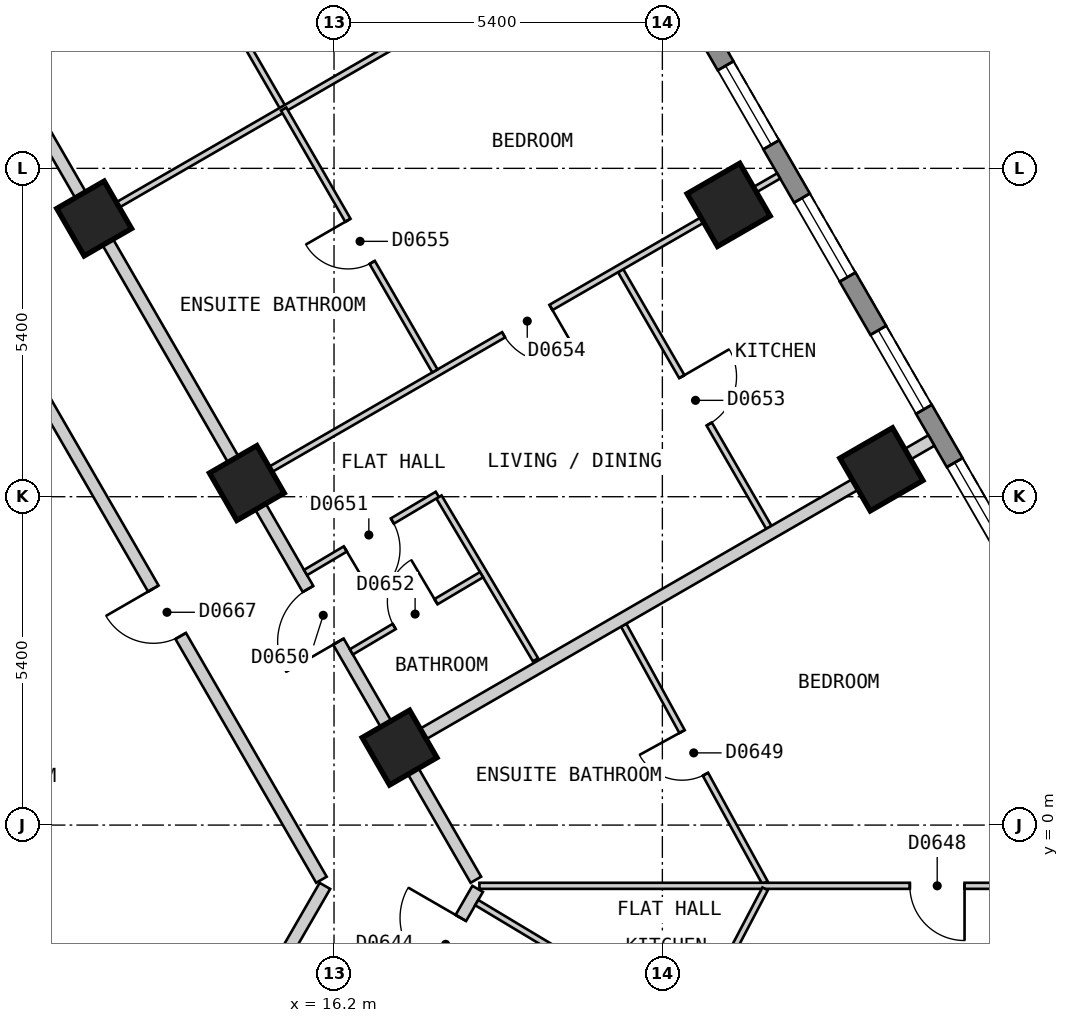
"""IFC4 building model, lengths in metres.
Left out: names, types, materials, properties, quantities, classifications, styles, units other than length and angle.
Written with IfcOpenShell. Run it as: python <this file> out.ifc"""

import sys

from ifc_helpers import new_model, si_unit, direction, frame, frame_2d, origin, origin_2d, place, context, subcontext, project, spatial, polyline, rectangle, outline, extrude, element, fill, save


model = new_model("IFC4")
c1 = context("Model", 3, precision=1e-05, world=origin(), true_north=direction((0.0, 1.0)))
c2 = subcontext(c1, "Body", "Model", "MODEL_VIEW")
j1 = project(units=[si_unit("LENGTHUNIT", "METRE"), si_unit("PLANEANGLEUNIT", "RADIAN")], contexts=[c1])
p1 = place(None, origin())
s1 = spatial("IfcSite", under=j1, at=p1, CompositionType="ELEMENT")
p2 = place(p1, origin())
s2 = spatial("IfcBuilding", under=s1, at=p2, CompositionType="ELEMENT")
p3 = place(p2, frame((0.0, 0.0, 81.0)))
s3 = spatial("IfcBuildingStorey", under=s2, at=p3, CompositionType="ELEMENT", Elevation=81.0)
for number, where, z_axis, x_axis in (
    (1, (25.202, 5.85, 0.0), (0.0, 0.0, 1.0), (-0.5, 0.866, 0.0)),
    (2, (22.69, 10.2, 0.0), (0.0, 0.0, 1.0), (-0.5, 0.866, 0.0)),
):
    element("IfcColumn", number, at=place(p3, frame(where, z_axis=z_axis, x_axis=x_axis)), inside=s3, PredefinedType="COLUMN", context=c2, shape_type="SweptSolid", body=[
        extrude(rectangle(XDim=1.0, YDim=1.0, at=origin_2d()), origin(), (0.0, 0.0, 1.0), 3.0),
    ])
for number, where, z_axis, x_axis in (
    (3, (17.278, 1.274, 0.0), (0.0, 0.0, 1.0), (-0.5, 0.866, 0.0)),
    (4, (14.766, 5.625, 0.0), (0.0, 0.0, 1.0), (-0.5, 0.866, 0.0)),
    (5, (12.255, 9.975, 0.0), (0.0, 0.0, 1.0), (-0.5, 0.866, 0.0)),
):
    element("IfcColumn", number, at=place(p3, frame(where, z_axis=z_axis, x_axis=x_axis)), inside=s3, PredefinedType="COLUMN", context=c2, shape_type="SweptSolid", body=[
        extrude(rectangle(XDim=0.9, YDim=0.9, at=origin_2d()), origin(), (0.0, 0.0, 1.0), 3.0),
    ])
p4 = place(p3, frame((29.027, 1.425, 0.0), z_axis=(0.0, 0.0, 1.0), x_axis=(-0.500027479704, 0.866009537788, 0.0)))
e6 = element("IfcWall", 6, at=p4, inside=s3, PredefinedType="SOLIDWALL", context=c2, shape_type="SweptSolid", body=[
    extrude(outline(polyline([(0.0, -0.15), (26.559, -0.15), (26.478, 0.15), (0.08, 0.15), (0.0, -0.15)])), origin(), (0.0, 0.0, 1.0), 2.7),
])
p5 = place(p4, frame((1.227, 0.0, 0.15)))
e7 = element("IfcOpeningElement", 7, at=p5, cuts=e6, PredefinedType="OPENING", context=c2, shape_type="SweptSolid", body=[
    extrude(rectangle(XDim=1.5, YDim=2.1, at=frame_2d((0.75, 1.05))), frame((0.0, 0.16, 0.0), z_axis=(0.0, -1.0, 0.0), x_axis=(1.0, 0.0, 0.0)), (0.0, 0.0, 1.0), 0.32),
])
p6 = place(p4, frame((3.738, 0.0, 0.15)))
e8 = element("IfcOpeningElement", 8, at=p6, cuts=e6, PredefinedType="OPENING", context=c2, shape_type="SweptSolid", body=[
    extrude(rectangle(XDim=1.5, YDim=2.1, at=frame_2d((0.75, 1.05))), frame((0.0, 0.16, 0.0), z_axis=(0.0, -1.0, 0.0), x_axis=(1.0, 0.0, 0.0)), (0.0, 0.0, 1.0), 0.32),
])
p7 = place(p4, frame((6.25, 0.0, 0.15)))
e9 = element("IfcOpeningElement", 9, at=p7, cuts=e6, PredefinedType="OPENING", context=c2, shape_type="SweptSolid", body=[
    extrude(rectangle(XDim=1.5, YDim=2.1, at=frame_2d((0.75, 1.05))), frame((0.0, 0.16, 0.0), z_axis=(0.0, -1.0, 0.0), x_axis=(1.0, 0.0, 0.0)), (0.0, 0.0, 1.0), 0.32),
])
p8 = place(p4, frame((8.761, 0.0, 0.15)))
e10 = element("IfcOpeningElement", 10, at=p8, cuts=e6, PredefinedType="OPENING", context=c2, shape_type="SweptSolid", body=[
    extrude(rectangle(XDim=1.5, YDim=2.1, at=frame_2d((0.75, 1.05))), frame((0.0, 0.16, 0.0), z_axis=(0.0, -1.0, 0.0), x_axis=(1.0, 0.0, 0.0)), (0.0, 0.0, 1.0), 0.32),
])
p9 = place(p4, frame((11.273, 0.0, 0.15)))
e11 = element("IfcOpeningElement", 11, at=p9, cuts=e6, PredefinedType="OPENING", context=c2, shape_type="SweptSolid", body=[
    extrude(rectangle(XDim=1.5, YDim=2.1, at=frame_2d((0.75, 1.05))), frame((0.0, 0.16, 0.0), z_axis=(0.0, -1.0, 0.0), x_axis=(1.0, 0.0, 0.0)), (0.0, 0.0, 1.0), 0.32),
])
p10 = place(p4, frame((13.785, 0.0, 0.15)))
e12 = element("IfcOpeningElement", 12, at=p10, cuts=e6, PredefinedType="OPENING", context=c2, shape_type="SweptSolid", body=[
    extrude(rectangle(XDim=1.5, YDim=2.1, at=frame_2d((0.75, 1.05))), frame((0.0, 0.16, 0.0), z_axis=(0.0, -1.0, 0.0), x_axis=(1.0, 0.0, 0.0)), (0.0, 0.0, 1.0), 0.32),
])
p11 = place(p4, frame((16.296, 0.0, 0.15)))
e13 = element("IfcOpeningElement", 13, at=p11, cuts=e6, PredefinedType="OPENING", context=c2, shape_type="SweptSolid", body=[
    extrude(rectangle(XDim=1.5, YDim=2.1, at=frame_2d((0.75, 1.05))), frame((0.0, 0.16, 0.0), z_axis=(0.0, -1.0, 0.0), x_axis=(1.0, 0.0, 0.0)), (0.0, 0.0, 1.0), 0.32),
])
p12 = place(p4, frame((18.807, 0.0, 0.15)))
e14 = element("IfcOpeningElement", 14, at=p12, cuts=e6, PredefinedType="OPENING", context=c2, shape_type="SweptSolid", body=[
    extrude(rectangle(XDim=1.5, YDim=2.1, at=frame_2d((0.75, 1.05))), frame((0.0, 0.16, 0.0), z_axis=(0.0, -1.0, 0.0), x_axis=(1.0, 0.0, 0.0)), (0.0, 0.0, 1.0), 0.32),
])
p13 = place(p4, frame((21.319, 0.0, 0.15)))
e15 = element("IfcOpeningElement", 15, at=p13, cuts=e6, PredefinedType="OPENING", context=c2, shape_type="SweptSolid", body=[
    extrude(rectangle(XDim=1.5, YDim=2.1, at=frame_2d((0.75, 1.05))), frame((0.0, 0.16, 0.0), z_axis=(0.0, -1.0, 0.0), x_axis=(1.0, 0.0, 0.0)), (0.0, 0.0, 1.0), 0.32),
])
p14 = place(p4, frame((23.831, 0.0, 0.15)))
e16 = element("IfcOpeningElement", 16, at=p14, cuts=e6, PredefinedType="OPENING", context=c2, shape_type="SweptSolid", body=[
    extrude(rectangle(XDim=1.5, YDim=2.1, at=frame_2d((0.75, 1.05))), frame((0.0, 0.16, 0.0), z_axis=(0.0, -1.0, 0.0), x_axis=(1.0, 0.0, 0.0)), (0.0, 0.0, 1.0), 0.32),
])
p15 = place(p3, frame((10.913, 7.899, 0.0), z_axis=(0.0, 0.0, 1.0), x_axis=(0.500028940566, -0.866008694296, 0.0)))
e17 = element("IfcWall", 17, at=p15, inside=s3, PredefinedType="PARTITIONING", context=c2, shape_type="SweptSolid", body=[
    extrude(rectangle(XDim=10.159, YDim=0.2, at=frame_2d((5.08, 0.0))), origin(), (0.0, 0.0, 1.0), 2.7),
])
p16 = place(p15, frame((4.63, 0.0, 0.0)))
e18 = element("IfcOpeningElement", 18, at=p16, cuts=e17, PredefinedType="OPENING", context=c2, shape_type="SweptSolid", body=[
    extrude(rectangle(XDim=0.9, YDim=2.1, at=frame_2d((0.45, 1.05))), frame((0.0, 0.11, 0.0), z_axis=(0.0, -1.0, 0.0), x_axis=(1.0, 0.0, 0.0)), (0.0, 0.0, 1.0), 0.22),
])
p17 = place(p3, frame((8.488, 16.5, 0.0), z_axis=(0.0, 0.0, 1.0), x_axis=(0.499986836607, -0.86603300354, 0.0)))
e19 = element("IfcWall", 19, at=p17, inside=s3, PredefinedType="PARTITIONING", context=c2, shape_type="SweptSolid", body=[
    extrude(rectangle(XDim=20.09, YDim=0.2, at=frame_2d((10.045, 0.0))), origin(), (0.0, 0.0, 1.0), 2.7),
])
p18 = place(p17, frame((14.569, 0.0, 0.0)))
e20 = element("IfcOpeningElement", 20, at=p18, cuts=e19, PredefinedType="OPENING", context=c2, shape_type="SweptSolid", body=[
    extrude(rectangle(XDim=1.0, YDim=2.1, at=frame_2d((0.5, 1.05))), frame((0.0, 0.11, 0.0), z_axis=(0.0, -1.0, 0.0), x_axis=(1.0, 0.0, 0.0)), (0.0, 0.0, 1.0), 0.22),
])
p19 = place(p3, frame((15.011, -2.8, 0.0), z_axis=(0.0, 0.0, 1.0), x_axis=(0.499929208183, 0.866066271601, 0.0)))
e21 = element("IfcWall", 21, at=p19, inside=s3, PredefinedType="PARTITIONING", context=c2, shape_type="SweptSolid", body=[
    extrude(rectangle(XDim=2.078, YDim=0.2, at=frame_2d((1.039, 0.0))), origin(), (0.0, 0.0, 1.0), 2.7),
])
p20 = place(p3, frame((15.771, -5.884, 0.0), z_axis=(0.0, 0.0, 1.0), x_axis=(0.499939494019, 0.866060334111, 0.0)))
e22 = element("IfcWall", 22, at=p20, inside=s3, PredefinedType="PARTITIONING", context=c2, shape_type="SweptSolid", body=[
    extrude(rectangle(XDim=5.583, YDim=0.2, at=frame_2d((2.792, 0.0))), origin(), (0.0, 0.0, 1.0), 2.7),
])
p21 = place(p20, frame((4.03, 0.0, 0.0)))
e23 = element("IfcOpeningElement", 23, at=p21, cuts=e22, PredefinedType="OPENING", context=c2, shape_type="SweptSolid", body=[
    extrude(rectangle(XDim=1.0, YDim=2.1, at=frame_2d((0.5, 1.05))), frame((0.0, 0.11, 0.0), z_axis=(0.0, -1.0, 0.0), x_axis=(1.0, 0.0, 0.0)), (0.0, 0.0, 1.0), 0.22),
])
p22 = place(p3, frame((17.926, 5.396, 0.0), z_axis=(0.0, 0.0, 1.0), x_axis=(0.510025922017, -0.860159031151, 0.0)))
e24 = element("IfcWall", 24, at=p22, inside=s3, PredefinedType="PARTITIONING", context=c2, shape_type="SweptSolid", body=[
    extrude(rectangle(XDim=3.113, YDim=0.1, at=frame_2d((1.557, 0.0))), origin(), (0.0, 0.0, 1.0), 2.7),
])
p23 = place(p3, frame((12.911, 16.038, 0.0), z_axis=(0.0, 0.0, 1.0), x_axis=(0.499974319101, -0.866040230151, 0.0)))
e25 = element("IfcWall", 25, at=p23, inside=s3, PredefinedType="PARTITIONING", context=c2, shape_type="SweptSolid", body=[
    extrude(rectangle(XDim=4.923, YDim=0.1, at=frame_2d((2.461, 0.0))), origin(), (0.0, 0.0, 1.0), 2.7),
])
p24 = place(p23, frame((2.012, 0.0, 0.0)))
e26 = element("IfcOpeningElement", 26, at=p24, cuts=e25, PredefinedType="OPENING", context=c2, shape_type="SweptSolid", body=[
    extrude(rectangle(XDim=0.8, YDim=2.1, at=frame_2d((0.4, 1.05))), frame((0.0, 0.06, 0.0), z_axis=(0.0, -1.0, 0.0), x_axis=(1.0, 0.0, 0.0)), (0.0, 0.0, 1.0), 0.12),
])
p25 = place(p3, frame((20.914, 9.117, 0.0), z_axis=(0.0, 0.0, 1.0), x_axis=(0.500007182864, -0.866021256716, 0.0)))
e27 = element("IfcWall", 27, at=p25, inside=s3, PredefinedType="PARTITIONING", context=c2, shape_type="SweptSolid", body=[
    extrude(rectangle(XDim=4.874, YDim=0.1, at=frame_2d((2.437, 0.0))), origin(), (0.0, 0.0, 1.0), 2.7),
])
p26 = place(p25, frame((2.012, 0.0, 0.0)))
e28 = element("IfcOpeningElement", 28, at=p26, cuts=e27, PredefinedType="OPENING", context=c2, shape_type="SweptSolid", body=[
    extrude(rectangle(XDim=0.9, YDim=2.1, at=frame_2d((0.45, 1.05))), frame((0.0, 0.06, 0.0), z_axis=(0.0, -1.0, 0.0), x_axis=(1.0, 0.0, 0.0)), (0.0, 0.0, 1.0), 0.12),
])
p27 = place(p3, frame((20.964, 3.287, 0.0), z_axis=(0.0, 0.0, 1.0), x_axis=(0.4810005962, -0.876720266936, 0.0)))
e29 = element("IfcWall", 29, at=p27, inside=s3, PredefinedType="PARTITIONING", context=c2, shape_type="SweptSolid", body=[
    extrude(rectangle(XDim=4.83, YDim=0.1, at=frame_2d((2.415, 0.0))), origin(), (0.0, 0.0, 1.0), 2.7),
])
p28 = place(p27, frame((1.995, 0.0, 0.0)))
e30 = element("IfcOpeningElement", 30, at=p28, cuts=e29, PredefinedType="OPENING", context=c2, shape_type="SweptSolid", body=[
    extrude(rectangle(XDim=0.8, YDim=2.1, at=frame_2d((0.4, 1.05))), frame((0.0, 0.06, 0.0), z_axis=(0.0, -1.0, 0.0), x_axis=(1.0, 0.0, 0.0)), (0.0, 0.0, 1.0), 0.12),
])
p29 = place(p3, frame((18.547, -1.275, 0.0), z_axis=(0.0, 0.0, 1.0), x_axis=(0.85733334763, -0.514761625456, 0.0)))
e31 = element("IfcWall", 31, at=p29, inside=s3, PredefinedType="PARTITIONING", context=c2, shape_type="SweptSolid", body=[
    extrude(rectangle(XDim=4.051, YDim=0.1, at=frame_2d((2.025, 0.0))), origin(), (0.0, 0.0, 1.0), 2.7),
])
p30 = place(p29, frame((1.55, 0.0, 0.0)))
e32 = element("IfcOpeningElement", 32, at=p30, cuts=e31, PredefinedType="OPENING", context=c2, shape_type="SweptSolid", body=[
    extrude(rectangle(XDim=0.9, YDim=2.1, at=frame_2d((0.45, 1.05))), frame((0.0, 0.06, 0.0), z_axis=(0.0, -1.0, 0.0), x_axis=(1.0, 0.0, 0.0)), (0.0, 0.0, 1.0), 0.12),
])
p31 = place(p3, frame((18.591, -0.999, 0.0), z_axis=(0.0, 0.0, 1.0), x_axis=(1.0, 0.0, 0.0)))
e33 = element("IfcWall", 33, at=p31, inside=s3, PredefinedType="PARTITIONING", context=c2, shape_type="SweptSolid", body=[
    extrude(rectangle(XDim=10.266, YDim=0.1, at=frame_2d((5.133, 0.0))), origin(), (0.0, 0.0, 1.0), 2.7),
])
p32 = place(p31, frame((7.079, 0.0, 0.0)))
e34 = element("IfcOpeningElement", 34, at=p32, cuts=e33, PredefinedType="OPENING", context=c2, shape_type="SweptSolid", body=[
    extrude(rectangle(XDim=0.9, YDim=2.1, at=frame_2d((0.45, 1.05))), frame((0.0, 0.06, 0.0), z_axis=(0.0, -1.0, 0.0), x_axis=(1.0, 0.0, 0.0)), (0.0, 0.0, 1.0), 0.12),
])
p33 = place(p3, frame((22.053, -3.403, 0.0), z_axis=(0.0, 0.0, 1.0), x_axis=(0.465190117005, 0.885210796952, 0.0)))
e35 = element("IfcWall", 35, at=p33, inside=s3, PredefinedType="PARTITIONING", context=c2, shape_type="SweptSolid", body=[
    extrude(rectangle(XDim=2.659, YDim=0.1, at=frame_2d((1.33, 0.0))), origin(), (0.0, 0.0, 1.0), 2.7),
])
p34 = place(p3, frame((14.853, 5.675, 0.0), z_axis=(0.0, 0.0, 1.0), x_axis=(0.866016855193, 0.500014806302, 0.0)))
e36 = element("IfcWall", 36, at=p34, inside=s3, PredefinedType="PARTITIONING", context=c2, shape_type="SweptSolid", body=[
    extrude(rectangle(XDim=10.0, YDim=0.1, at=frame_2d((5.0, 0.0))), origin(), (0.0, 0.0, 1.0), 2.7),
])
p35 = place(p34, frame((4.775, 0.0, 0.0)))
e37 = element("IfcOpeningElement", 37, at=p35, cuts=e36, PredefinedType="OPENING", context=c2, shape_type="SweptSolid", body=[
    extrude(rectangle(XDim=0.9, YDim=2.1, at=frame_2d((0.45, 1.05))), frame((0.0, 0.06, 0.0), z_axis=(0.0, -1.0, 0.0), x_axis=(1.0, 0.0, 0.0)), (0.0, 0.0, 1.0), 0.12),
])
p36 = place(p3, frame((12.342, 10.025, 0.0), z_axis=(0.0, 0.0, 1.0), x_axis=(0.865992435864, 0.500057097767, 0.0)))
e38 = element("IfcWall", 38, at=p36, inside=s3, PredefinedType="PARTITIONING", context=c2, shape_type="SweptSolid", body=[
    extrude(rectangle(XDim=9.999, YDim=0.1, at=frame_2d((5.0, 0.0))), origin(), (0.0, 0.0, 1.0), 2.7),
])
p37 = place(p36, frame((6.3, 0.0, 0.0)))
e39 = element("IfcOpeningElement", 39, at=p37, cuts=e38, PredefinedType="OPENING", context=c2, shape_type="SweptSolid", body=[
    extrude(rectangle(XDim=0.9, YDim=2.1, at=frame_2d((0.45, 1.05))), frame((0.0, 0.06, 0.0), z_axis=(0.0, -1.0, 0.0), x_axis=(1.0, 0.0, 0.0)), (0.0, 0.0, 1.0), 0.12),
])
p38 = place(p3, frame((15.732, 4.153, 0.0), z_axis=(0.0, 0.0, 1.0), x_axis=(0.859987631152, 0.510314877566, 0.0)))
e40 = element("IfcWall", 40, at=p38, inside=s3, PredefinedType="PARTITIONING", context=c2, shape_type="SweptSolid", body=[
    extrude(rectangle(XDim=2.52, YDim=0.1, at=frame_2d((1.26, 0.0))), origin(), (0.0, 0.0, 1.0), 2.7),
])
p39 = place(p38, frame((0.76, 0.0, 0.0)))
e41 = element("IfcOpeningElement", 41, at=p39, cuts=e40, PredefinedType="OPENING", context=c2, shape_type="SweptSolid", body=[
    extrude(rectangle(XDim=0.9, YDim=2.1, at=frame_2d((0.45, 1.05))), frame((0.0, 0.06, 0.0), z_axis=(0.0, -1.0, 0.0), x_axis=(1.0, 0.0, 0.0)), (0.0, 0.0, 1.0), 0.12),
])
p40 = place(p3, frame((16.485, 2.848, 0.0), z_axis=(0.0, 0.0, 1.0), x_axis=(0.860052465539, 0.510205602205, 0.0)))
e42 = element("IfcWall", 42, at=p40, inside=s3, PredefinedType="PARTITIONING", context=c2, shape_type="SweptSolid", body=[
    extrude(rectangle(XDim=2.489, YDim=0.1, at=frame_2d((1.245, 0.0))), origin(), (0.0, 0.0, 1.0), 2.7),
])
p41 = place(p40, frame((0.819, 0.0, 0.0)))
e43 = element("IfcOpeningElement", 43, at=p41, cuts=e42, PredefinedType="OPENING", context=c2, shape_type="SweptSolid", body=[
    extrude(rectangle(XDim=0.8, YDim=2.1, at=frame_2d((0.4, 1.05))), frame((0.0, 0.06, 0.0), z_axis=(0.0, -1.0, 0.0), x_axis=(1.0, 0.0, 0.0)), (0.0, 0.0, 1.0), 0.12),
])
p42 = place(p3, frame((17.365, 1.325, 0.0), z_axis=(0.0, 0.0, 1.0), x_axis=(0.866016855193, 0.500014806302, 0.0)))
e44 = element("IfcWall", 44, at=p42, inside=s3, PredefinedType="PARTITIONING", context=c2, shape_type="SweptSolid", body=[
    extrude(rectangle(XDim=10.0, YDim=0.2, at=frame_2d((5.0, 0.0))), origin(), (0.0, 0.0, 1.0), 2.7),
])
p43 = place(p3, frame((15.372, 11.775, 0.0), z_axis=(0.0, 0.0, 1.0), x_axis=(0.500035488351, -0.866004913606, 0.0)))
e45 = element("IfcWall", 45, at=p43, inside=s3, PredefinedType="PARTITIONING", context=c2, shape_type="SweptSolid", body=[
    extrude(rectangle(XDim=4.973, YDim=0.1, at=frame_2d((2.487, 0.0))), origin(), (0.0, 0.0, 1.0), 2.7),
])
p44 = place(p43, frame((2.112, 0.0, 0.0)))
e46 = element("IfcOpeningElement", 46, at=p44, cuts=e45, PredefinedType="OPENING", context=c2, shape_type="SweptSolid", body=[
    extrude(rectangle(XDim=0.8, YDim=2.1, at=frame_2d((0.4, 1.05))), frame((0.0, 0.06, 0.0), z_axis=(0.0, -1.0, 0.0), x_axis=(1.0, 0.0, 0.0)), (0.0, 0.0, 1.0), 0.12),
])
p45 = place(p6, origin())
e47 = element("IfcWindow", 47, at=p45, inside=s3, PartitioningType="SINGLE_PANEL", PredefinedType="WINDOW", context=c2, shape_type="SweptSolid", body=[
    extrude(rectangle(XDim=1.5, YDim=2.1, at=frame_2d((0.75, 1.05))), frame((0.0, 0.03, 0.0), z_axis=(0.0, -1.0, 0.0), x_axis=(1.0, 0.0, 0.0)), (0.0, 0.0, 1.0), 0.06),
])
fill(e8, e47)
p46 = place(p7, origin())
e48 = element("IfcWindow", 48, at=p46, inside=s3, PartitioningType="SINGLE_PANEL", PredefinedType="WINDOW", context=c2, shape_type="SweptSolid", body=[
    extrude(rectangle(XDim=1.5, YDim=2.1, at=frame_2d((0.75, 1.05))), frame((0.0, 0.03, 0.0), z_axis=(0.0, -1.0, 0.0), x_axis=(1.0, 0.0, 0.0)), (0.0, 0.0, 1.0), 0.06),
])
fill(e9, e48)
p47 = place(p8, origin())
e49 = element("IfcWindow", 49, at=p47, inside=s3, PartitioningType="SINGLE_PANEL", PredefinedType="WINDOW", context=c2, shape_type="SweptSolid", body=[
    extrude(rectangle(XDim=1.5, YDim=2.1, at=frame_2d((0.75, 1.05))), frame((0.0, 0.03, 0.0), z_axis=(0.0, -1.0, 0.0), x_axis=(1.0, 0.0, 0.0)), (0.0, 0.0, 1.0), 0.06),
])
fill(e10, e49)
p48 = place(p9, origin())
e50 = element("IfcWindow", 50, at=p48, inside=s3, PartitioningType="SINGLE_PANEL", PredefinedType="WINDOW", context=c2, shape_type="SweptSolid", body=[
    extrude(rectangle(XDim=1.5, YDim=2.1, at=frame_2d((0.75, 1.05))), frame((0.0, 0.03, 0.0), z_axis=(0.0, -1.0, 0.0), x_axis=(1.0, 0.0, 0.0)), (0.0, 0.0, 1.0), 0.06),
])
fill(e11, e50)
p49 = place(p21, origin())
e51 = element("IfcDoor", 51, at=p49, inside=s3, OperationType="SINGLE_SWING_RIGHT", PredefinedType="DOOR", context=c2, shape_type="SweptSolid", body=[
    extrude(rectangle(XDim=1.0, YDim=2.1, at=frame_2d((0.5, 1.05))), frame((0.0, 0.025, 0.0), z_axis=(0.0, -1.0, 0.0), x_axis=(1.0, 0.0, 0.0)), (0.0, 0.0, 1.0), 0.05),
])
fill(e23, e51)
p50 = place(p32, origin())
e52 = element("IfcDoor", 52, at=p50, inside=s3, OperationType="SINGLE_SWING_RIGHT", PredefinedType="DOOR", context=c2, shape_type="SweptSolid", body=[
    extrude(rectangle(XDim=0.9, YDim=2.1, at=frame_2d((0.45, 1.05))), frame((0.0, 0.025, 0.0), z_axis=(0.0, -1.0, 0.0), x_axis=(1.0, 0.0, 0.0)), (0.0, 0.0, 1.0), 0.05),
])
fill(e34, e52)
p51 = place(p28, origin())
e53 = element("IfcDoor", 53, at=p51, inside=s3, OperationType="SINGLE_SWING_LEFT", PredefinedType="DOOR", context=c2, shape_type="SweptSolid", body=[
    extrude(rectangle(XDim=0.8, YDim=2.1, at=frame_2d((0.4, 1.05))), frame((0.0, 0.025, 0.0), z_axis=(0.0, -1.0, 0.0), x_axis=(1.0, 0.0, 0.0)), (0.0, 0.0, 1.0), 0.05),
])
fill(e30, e53)
p52 = place(p18, origin())
e54 = element("IfcDoor", 54, at=p52, inside=s3, OperationType="SINGLE_SWING_RIGHT", PredefinedType="DOOR", context=c2, shape_type="SweptSolid", body=[
    extrude(rectangle(XDim=1.0, YDim=2.1, at=frame_2d((0.5, 1.05))), frame((0.0, 0.025, 0.0), z_axis=(0.0, -1.0, 0.0), x_axis=(1.0, 0.0, 0.0)), (0.0, 0.0, 1.0), 0.05),
])
fill(e20, e54)
p53 = place(p39, origin())
e55 = element("IfcDoor", 55, at=p53, inside=s3, OperationType="SINGLE_SWING_LEFT", PredefinedType="DOOR", context=c2, shape_type="SweptSolid", body=[
    extrude(rectangle(XDim=0.9, YDim=2.1, at=frame_2d((0.45, 1.05))), frame((0.0, 0.025, 0.0), z_axis=(0.0, -1.0, 0.0), x_axis=(1.0, 0.0, 0.0)), (0.0, 0.0, 1.0), 0.05),
])
fill(e41, e55)
p54 = place(p41, origin())
e56 = element("IfcDoor", 56, at=p54, inside=s3, OperationType="SINGLE_SWING_RIGHT", PredefinedType="DOOR", context=c2, shape_type="SweptSolid", body=[
    extrude(rectangle(XDim=0.8, YDim=2.1, at=frame_2d((0.4, 1.05))), frame((0.0, 0.025, 0.0), z_axis=(0.0, -1.0, 0.0), x_axis=(1.0, 0.0, 0.0)), (0.0, 0.0, 1.0), 0.05),
])
fill(e43, e56)
p55 = place(p26, origin())
e57 = element("IfcDoor", 57, at=p55, inside=s3, OperationType="SINGLE_SWING_LEFT", PredefinedType="DOOR", context=c2, shape_type="SweptSolid", body=[
    extrude(rectangle(XDim=0.9, YDim=2.1, at=frame_2d((0.45, 1.05))), frame((0.0, 0.025, 0.0), z_axis=(0.0, -1.0, 0.0), x_axis=(1.0, 0.0, 0.0)), (0.0, 0.0, 1.0), 0.05),
])
fill(e28, e57)
p56 = place(p35, origin())
e58 = element("IfcDoor", 58, at=p56, inside=s3, OperationType="SINGLE_SWING_RIGHT", PredefinedType="DOOR", context=c2, shape_type="SweptSolid", body=[
    extrude(rectangle(XDim=0.9, YDim=2.1, at=frame_2d((0.45, 1.05))), frame((0.0, 0.025, 0.0), z_axis=(0.0, -1.0, 0.0), x_axis=(1.0, 0.0, 0.0)), (0.0, 0.0, 1.0), 0.05),
])
fill(e37, e58)
p57 = place(p44, origin())
e59 = element("IfcDoor", 59, at=p57, inside=s3, OperationType="SINGLE_SWING_LEFT", PredefinedType="DOOR", context=c2, shape_type="SweptSolid", body=[
    extrude(rectangle(XDim=0.8, YDim=2.1, at=frame_2d((0.4, 1.05))), frame((0.0, 0.025, 0.0), z_axis=(0.0, -1.0, 0.0), x_axis=(1.0, 0.0, 0.0)), (0.0, 0.0, 1.0), 0.05),
])
fill(e46, e59)
p58 = place(p16, origin())
e60 = element("IfcDoor", 60, at=p58, inside=s3, OperationType="SINGLE_SWING_LEFT", PredefinedType="DOOR", context=c2, shape_type="SweptSolid", body=[
    extrude(rectangle(XDim=0.9, YDim=2.1, at=frame_2d((0.45, 1.05))), frame((0.0, 0.025, 0.0), z_axis=(0.0, -1.0, 0.0), x_axis=(1.0, 0.0, 0.0)), (0.0, 0.0, 1.0), 0.05),
])
fill(e18, e60)
save(model, sys.argv[1])
